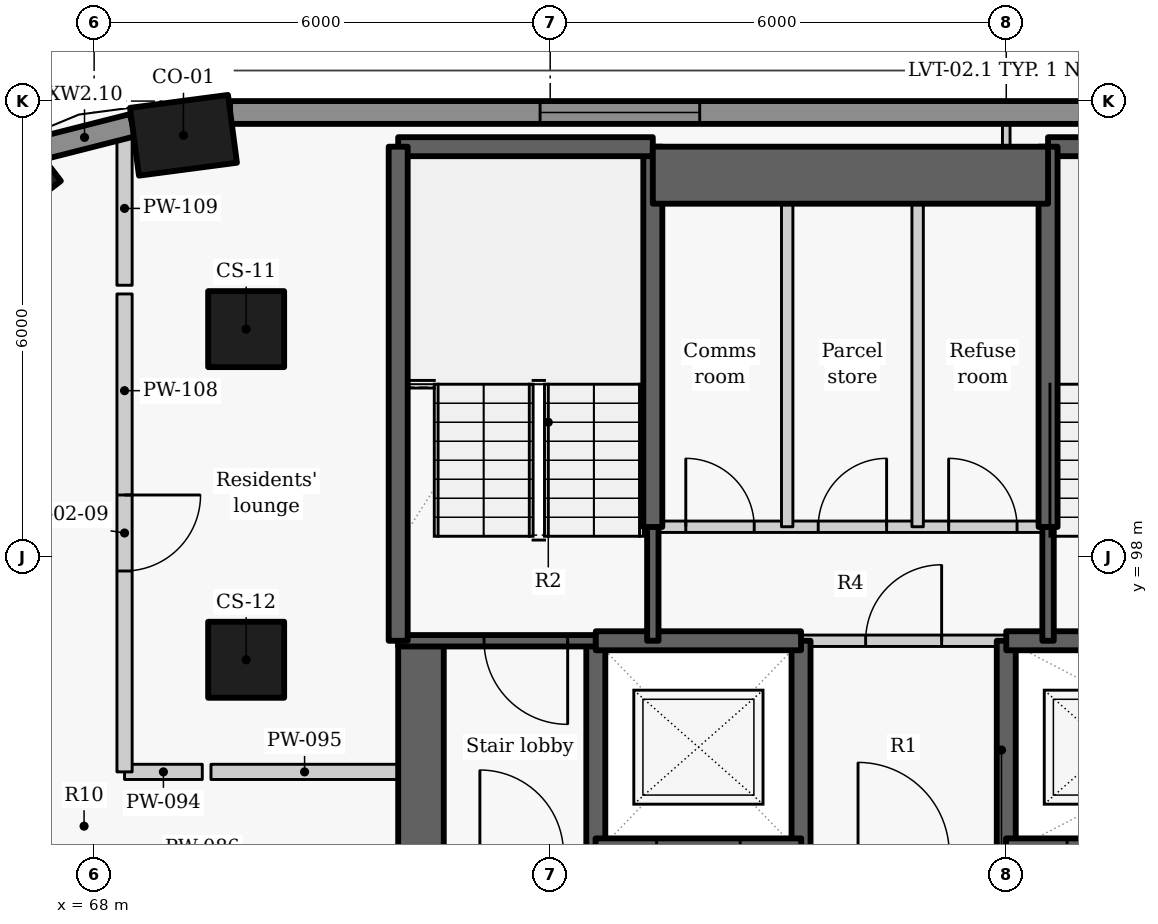
"""IFC4 building model, lengths in metres.
Left out: names, types, materials, properties, quantities, classifications, styles, units other than length and angle.
Written with IfcOpenShell. Run it as: python <this file> out.ifc"""

import sys

from ifc_helpers import new_model, si_unit, direction, frame, frame_2d, origin, origin_2d, place, context, subcontext, project, spatial, rectangle, extrude, element, fill, save


model = new_model("IFC4")
c1 = context("Model", 3, precision=1e-05, world=origin(), true_north=direction((0.0, 1.0)))
c2 = subcontext(c1, "Body", "Model", "MODEL_VIEW")
j1 = project(units=[si_unit("LENGTHUNIT", "METRE"), si_unit("PLANEANGLEUNIT", "RADIAN")], contexts=[c1])
p1 = place(None, origin())
s1 = spatial("IfcSite", under=j1, at=p1, CompositionType="ELEMENT")
p2 = place(p1, origin())
s2 = spatial("IfcBuilding", under=s1, at=p2, CompositionType="ELEMENT")
p3 = place(p2, frame((0.0, 0.0, 127.2)))
s3 = spatial("IfcBuildingStorey", under=s2, at=p3, CompositionType="ELEMENT", Elevation=127.2)
for number, where, z_axis, x_axis in (
    (1, (69.175, 103.55, 0.0), (0.0, 0.0, 1.0), (-0.991, -0.131, 0.0)),
    (2, (66.773, 102.91, 0.0), (0.0, 0.0, 1.0), (-0.793, -0.609, 0.0)),
):
    element("IfcColumn", number, at=place(p3, frame(where, z_axis=z_axis, x_axis=x_axis)), inside=s3, PredefinedType="COLUMN", context=c2, shape_type="SweptSolid", body=[
        extrude(rectangle(XDim=1.3, YDim=0.9, at=origin_2d()), origin(), (0.0, 0.0, 1.0), 3.3),
    ])
for number, where, z_axis, x_axis in (
    (3, (70.0, 101.0, 0.0), (0.0, 0.0, 1.0), (0.0, -1.0, 0.0)),
    (4, (70.0, 96.65, 0.0), (0.0, 0.0, 1.0), (0.0, -1.0, 0.0)),
):
    element("IfcColumn", number, at=place(p3, frame(where, z_axis=z_axis, x_axis=x_axis)), inside=s3, PredefinedType="COLUMN", context=c2, shape_type="SweptSolid", body=[
        extrude(rectangle(XDim=1.0, YDim=1.0, at=origin_2d()), origin(), (0.0, 0.0, 1.0), 3.3),
    ])
p4 = place(p3, frame((90.179, 103.85, 0.0), z_axis=(0.0, 0.0, 1.0), x_axis=(-1.0, 0.0, 0.0)))
e5 = element("IfcWall", 5, at=p4, inside=s3, PredefinedType="SOLIDWALL", context=c2, shape_type="SweptSolid", body=[
    extrude(rectangle(XDim=20.391, YDim=0.3, at=frame_2d((10.196, 0.0))), origin(), (0.0, 0.0, 1.0), 2.425),
])
p5 = place(p4, frame((4.051, 0.0, 0.9)))
e6 = element("IfcOpeningElement", 6, at=p5, cuts=e5, PredefinedType="OPENING", context=c2, shape_type="SweptSolid", body=[
    extrude(rectangle(XDim=2.1, YDim=1.1, at=frame_2d((1.05, 0.55))), frame((0.0, 0.16, 0.0), z_axis=(0.0, -1.0, 0.0), x_axis=(1.0, 0.0, 0.0)), (0.0, 0.0, 1.0), 0.32),
])
p6 = place(p4, frame((14.212, 0.0, 0.9)))
e7 = element("IfcOpeningElement", 7, at=p6, cuts=e5, PredefinedType="OPENING", context=c2, shape_type="SweptSolid", body=[
    extrude(rectangle(XDim=2.1, YDim=1.1, at=frame_2d((1.05, 0.55))), frame((0.0, 0.16, 0.0), z_axis=(0.0, -1.0, 0.0), x_axis=(1.0, 0.0, 0.0)), (0.0, 0.0, 1.0), 0.32),
])
p7 = place(p3, frame((68.506, 103.683, 0.0), z_axis=(0.0, 0.0, 1.0), x_axis=(-0.96924493129, -0.246098076322, 0.0)))
e8 = element("IfcWall", 8, at=p7, inside=s3, PredefinedType="SOLIDWALL", context=c2, shape_type="SweptSolid", body=[
    extrude(rectangle(XDim=1.305, YDim=0.3, at=frame_2d((0.653, 0.0))), origin(), (0.0, 0.0, 1.0), 2.425),
])
p8 = place(p3, frame((74.6, 94.1, -0.41), z_axis=(0.0, 0.0, 1.0), x_axis=(0.0, 1.0, 0.0)))
e9 = element("IfcWall", 9, at=p8, inside=s3, PredefinedType="SHEAR", context=c2, shape_type="SweptSolid", body=[
    extrude(rectangle(XDim=2.8, YDim=0.25, at=frame_2d((1.4, 0.0))), origin(), (0.0, 0.0, 1.0), 3.435),
])
p9 = place(p3, frame((72.3, 87.8, -0.41), z_axis=(0.0, 0.0, 1.0), x_axis=(0.0, 1.0, 0.0)))
e10 = element("IfcWall", 10, at=p9, inside=s3, PredefinedType="SHEAR", context=c2, shape_type="SweptSolid", body=[
    extrude(rectangle(XDim=9.1, YDim=0.6, at=frame_2d((4.55, 0.0))), origin(), (0.0, 0.0, 1.0), 3.435),
])
p10 = place(p9, frame((3.852, 0.0, 0.41)))
e11 = element("IfcOpeningElement", 11, at=p10, cuts=e10, PredefinedType="OPENING", context=c2, shape_type="SweptSolid", body=[
    extrude(rectangle(XDim=1.5, YDim=2.1, at=frame_2d((0.75, 1.05))), frame((0.0, 0.31, 0.0), z_axis=(0.0, -1.0, 0.0), x_axis=(1.0, 0.0, 0.0)), (0.0, 0.0, 1.0), 0.62),
])
for number, where, z_axis, x_axis in (
    (12, (77.3, 94.1, -0.41), (0.0, 0.0, 1.0), (0.0, 1.0, 0.0)),
    (13, (80.0, 94.1, -0.41), (0.0, 0.0, 1.0), (0.0, 1.0, 0.0)),
):
    element("IfcWall", number, at=place(p3, frame(where, z_axis=z_axis, x_axis=x_axis)), inside=s3, PredefinedType="SHEAR", context=c2, shape_type="SweptSolid", body=[
        extrude(rectangle(XDim=2.8, YDim=0.25, at=frame_2d((1.4, 0.0))), origin(), (0.0, 0.0, 1.0), 3.435),
    ])
p11 = place(p3, frame((74.597, 94.1, -0.41), z_axis=(0.0, 0.0, 1.0), x_axis=(1.0, 0.0, 0.0)))
e14 = element("IfcWall", 14, at=p11, inside=s3, PredefinedType="SHEAR", context=c2, shape_type="SweptSolid", body=[
    extrude(rectangle(XDim=2.706, YDim=0.4, at=frame_2d((1.353, 0.0))), origin(), (0.0, 0.0, 1.0), 3.435),
])
p12 = place(p11, frame((0.803, 0.0, 0.41)))
e15 = element("IfcOpeningElement", 15, at=p12, cuts=e14, PredefinedType="OPENING", context=c2, shape_type="SweptSolid", body=[
    extrude(rectangle(XDim=1.1, YDim=2.1, at=frame_2d((0.55, 1.05))), frame((0.0, 0.21, 0.0), z_axis=(0.0, -1.0, 0.0), x_axis=(1.0, 0.0, 0.0)), (0.0, 0.0, 1.0), 0.42),
])
p13 = place(p3, frame((79.997, 94.1, -0.41), z_axis=(0.0, 0.0, 1.0), x_axis=(1.0, 0.0, 0.0)))
e16 = element("IfcWall", 16, at=p13, inside=s3, PredefinedType="SHEAR", context=c2, shape_type="SweptSolid", body=[
    extrude(rectangle(XDim=5.406, YDim=0.4, at=frame_2d((2.703, 0.0))), origin(), (0.0, 0.0, 1.0), 3.435),
])
p14 = place(p13, frame((0.803, 0.0, 0.41)))
e17 = element("IfcOpeningElement", 17, at=p14, cuts=e16, PredefinedType="OPENING", context=c2, shape_type="SweptSolid", body=[
    extrude(rectangle(XDim=1.1, YDim=2.1, at=frame_2d((0.55, 1.05))), frame((0.0, 0.21, 0.0), z_axis=(0.0, -1.0, 0.0), x_axis=(1.0, 0.0, 0.0)), (0.0, 0.0, 1.0), 0.42),
])
p15 = place(p3, frame((74.6, 96.9, -0.41), z_axis=(0.0, 0.0, 1.0), x_axis=(-1.0, 0.0, 0.0)))
e18 = element("IfcWall", 18, at=p15, inside=s3, PredefinedType="SHEAR", context=c2, shape_type="SweptSolid", body=[
    extrude(rectangle(XDim=2.6, YDim=0.15, at=frame_2d((1.3, 0.0))), origin(), (0.0, 0.0, 1.0), 3.435),
])
p16 = place(p15, frame((0.37, 0.0, 0.41)))
e19 = element("IfcOpeningElement", 19, at=p16, cuts=e18, PredefinedType="OPENING", context=c2, shape_type="SweptSolid", body=[
    extrude(rectangle(XDim=1.1, YDim=2.1, at=frame_2d((0.55, 1.05))), frame((0.0, 0.085, 0.0), z_axis=(0.0, -1.0, 0.0), x_axis=(1.0, 0.0, 0.0)), (0.0, 0.0, 1.0), 0.17),
])
p17 = place(p3, frame((74.6, 96.9, -0.41), z_axis=(0.0, 0.0, 1.0), x_axis=(1.0, 0.0, 0.0)))
e20 = element("IfcWall", 20, at=p17, inside=s3, PredefinedType="SHEAR", context=c2, shape_type="SweptSolid", body=[
    extrude(rectangle(XDim=2.7, YDim=0.25, at=frame_2d((1.35, 0.0))), origin(), (0.0, 0.0, 1.0), 3.435),
])
p18 = place(p3, frame((80.0, 96.9, -0.41), z_axis=(0.0, 0.0, 1.0), x_axis=(1.0, 0.0, 0.0)))
e21 = element("IfcWall", 21, at=p18, inside=s3, PredefinedType="SHEAR", context=c2, shape_type="SweptSolid", body=[
    extrude(rectangle(XDim=8.0, YDim=0.25, at=frame_2d((4.0, 0.0))), origin(), (0.0, 0.0, 1.0), 3.435),
])
p19 = place(p18, frame((3.849, 0.0, 0.41)))
e22 = element("IfcOpeningElement", 22, at=p19, cuts=e21, PredefinedType="OPENING", context=c2, shape_type="SweptSolid", body=[
    extrude(rectangle(XDim=1.1, YDim=2.1, at=frame_2d((0.55, 1.05))), frame((0.0, 0.135, 0.0), z_axis=(0.0, -1.0, 0.0), x_axis=(1.0, 0.0, 0.0)), (0.0, 0.0, 1.0), 0.27),
])
p20 = place(p3, frame((77.3, 96.9, 0.0), z_axis=(0.0, 0.0, 1.0), x_axis=(1.0, 0.0, 0.0)))
e23 = element("IfcWall", 23, at=p20, inside=s3, PredefinedType="PARTITIONING", context=c2, shape_type="SweptSolid", body=[
    extrude(rectangle(XDim=2.7, YDim=0.15, at=frame_2d((1.35, 0.0))), origin(), (0.0, 0.0, 1.0), 3.025),
])
p21 = place(p20, frame((0.85, 0.0, 0.0)))
e24 = element("IfcOpeningElement", 24, at=p21, cuts=e23, PredefinedType="OPENING", context=c2, shape_type="SweptSolid", body=[
    extrude(rectangle(XDim=1.0, YDim=2.1, at=frame_2d((0.5, 1.05))), frame((0.0, 0.085, 0.0), z_axis=(0.0, -1.0, 0.0), x_axis=(1.0, 0.0, 0.0)), (0.0, 0.0, 1.0), 0.17),
])
p22 = place(p3, frame((75.35, 96.9, -0.41), z_axis=(0.0, 0.0, 1.0), x_axis=(0.0, 1.0, 0.0)))
e25 = element("IfcWall", 25, at=p22, inside=s3, PredefinedType="SHEAR", context=c2, shape_type="SweptSolid", body=[
    extrude(rectangle(XDim=1.503, YDim=0.15, at=frame_2d((0.751, 0.0))), origin(), (0.0, 0.0, 1.0), 3.435),
])
p23 = place(p3, frame((75.35, 98.397, -0.41), z_axis=(0.0, 0.0, 1.0), x_axis=(0.0, 1.0, 0.0)))
e26 = element("IfcWall", 26, at=p23, inside=s3, PredefinedType="SHEAR", context=c2, shape_type="SweptSolid", body=[
    extrude(rectangle(XDim=5.003, YDim=0.25, at=frame_2d((2.501, 0.0))), origin(), (0.0, 0.0, 1.0), 3.435),
])
p24 = place(p3, frame((72.0, 103.4, 0.0), z_axis=(0.0, 0.0, 1.0), x_axis=(1.0, 0.0, 0.0)))
e27 = element("IfcWall", 27, at=p24, inside=s3, PredefinedType="SHEAR", context=c2, shape_type="SweptSolid", body=[
    extrude(rectangle(XDim=3.35, YDim=0.25, at=frame_2d((1.675, 0.0))), origin(), (0.0, 0.0, 1.0), 3.025),
])
p25 = place(p3, frame((80.55, 103.4, 0.0), z_axis=(0.0, 0.0, 1.0), x_axis=(1.0, 0.0, 0.0)))
e28 = element("IfcWall", 28, at=p25, inside=s3, PredefinedType="SHEAR", context=c2, shape_type="SweptSolid", body=[
    extrude(rectangle(XDim=2.85, YDim=0.25, at=frame_2d((1.425, 0.0))), origin(), (0.0, 0.0, 1.0), 3.025),
])
p26 = place(p3, frame((72.0, 96.9, -0.41), z_axis=(0.0, 0.0, 1.0), x_axis=(0.0, 1.0, 0.0)))
e29 = element("IfcWall", 29, at=p26, inside=s3, PredefinedType="SHEAR", context=c2, shape_type="SweptSolid", body=[
    extrude(rectangle(XDim=6.5, YDim=0.25, at=frame_2d((3.25, 0.0))), origin(), (0.0, 0.0, 1.0), 3.435),
])
p27 = place(p3, frame((80.55, 96.9, -0.41), z_axis=(0.0, 0.0, 1.0), x_axis=(0.0, 1.0, 0.0)))
e30 = element("IfcWall", 30, at=p27, inside=s3, PredefinedType="SHEAR", context=c2, shape_type="SweptSolid", body=[
    extrude(rectangle(XDim=1.503, YDim=0.15, at=frame_2d((0.751, 0.0))), origin(), (0.0, 0.0, 1.0), 3.435),
])
p28 = place(p3, frame((80.55, 98.397, -0.41), z_axis=(0.0, 0.0, 1.0), x_axis=(0.0, 1.0, 0.0)))
e31 = element("IfcWall", 31, at=p28, inside=s3, PredefinedType="SHEAR", context=c2, shape_type="SweptSolid", body=[
    extrude(rectangle(XDim=5.003, YDim=0.25, at=frame_2d((2.501, 0.0))), origin(), (0.0, 0.0, 1.0), 3.435),
])
p29 = place(p3, frame((75.35, 103.025, -0.41), z_axis=(0.0, 0.0, 1.0), x_axis=(1.0, 0.0, 0.0)))
e32 = element("IfcWall", 32, at=p29, inside=s3, PredefinedType="SHEAR", context=c2, shape_type="SweptSolid", body=[
    extrude(rectangle(XDim=5.2, YDim=0.75, at=frame_2d((2.6, 0.0))), origin(), (0.0, 0.0, 1.0), 3.435),
])
p30 = place(p3, frame((75.35, 98.4, 0.0), z_axis=(0.0, 0.0, 1.0), x_axis=(1.0, 0.0, 0.0)))
e33 = element("IfcWall", 33, at=p30, inside=s3, PredefinedType="PARTITIONING", context=c2, shape_type="SweptSolid", body=[
    extrude(rectangle(XDim=5.2, YDim=0.15, at=frame_2d((2.6, 0.0))), origin(), (0.0, 0.0, 1.0), 3.025),
])
p31 = place(p30, frame((0.434, 0.0, 0.0)))
e34 = element("IfcOpeningElement", 34, at=p31, cuts=e33, PredefinedType="OPENING", context=c2, shape_type="SweptSolid", body=[
    extrude(rectangle(XDim=0.9, YDim=2.1, at=frame_2d((0.45, 1.05))), frame((0.0, 0.085, 0.0), z_axis=(0.0, -1.0, 0.0), x_axis=(1.0, 0.0, 0.0)), (0.0, 0.0, 1.0), 0.17),
])
p32 = place(p30, frame((2.176, 0.0, 0.0)))
e35 = element("IfcOpeningElement", 35, at=p32, cuts=e33, PredefinedType="OPENING", context=c2, shape_type="SweptSolid", body=[
    extrude(rectangle(XDim=0.9, YDim=2.1, at=frame_2d((0.45, 1.05))), frame((0.0, 0.085, 0.0), z_axis=(0.0, -1.0, 0.0), x_axis=(1.0, 0.0, 0.0)), (0.0, 0.0, 1.0), 0.17),
])
p33 = place(p30, frame((3.892, 0.0, 0.0)))
e36 = element("IfcOpeningElement", 36, at=p33, cuts=e33, PredefinedType="OPENING", context=c2, shape_type="SweptSolid", body=[
    extrude(rectangle(XDim=0.9, YDim=2.1, at=frame_2d((0.45, 1.05))), frame((0.0, 0.085, 0.0), z_axis=(0.0, -1.0, 0.0), x_axis=(1.0, 0.0, 0.0)), (0.0, 0.0, 1.0), 0.17),
])
for number, where, z_axis, x_axis in (
    (37, (77.118, 98.4, 0.0), (0.0, 0.0, 1.0), (0.0, 1.0, 0.0)),
    (38, (78.834, 98.4, 0.0), (0.0, 0.0, 1.0), (0.0, 1.0, 0.0)),
):
    element("IfcWall", number, at=place(p3, frame(where, z_axis=z_axis, x_axis=x_axis)), inside=s3, PredefinedType="PARTITIONING", context=c2, shape_type="SweptSolid", body=[
        extrude(rectangle(XDim=5.0, YDim=0.15, at=frame_2d((2.5, 0.0))), origin(), (0.0, 0.0, 1.0), 3.025),
    ])
p34 = place(p3, frame((68.4, 95.175, 0.0), z_axis=(0.0, 0.0, 1.0), x_axis=(1.0, 0.0, 0.0)))
e39 = element("IfcWall", 39, at=p34, inside=s3, PredefinedType="PARTITIONING", context=c2, shape_type="SweptSolid", body=[
    extrude(rectangle(XDim=1.023, YDim=0.2, at=frame_2d((0.511, 0.0))), origin(), (0.0, 0.0, 1.0), 3.025),
])
p35 = place(p3, frame((69.537, 95.175, 0.0), z_axis=(0.0, 0.0, 1.0), x_axis=(1.0, 0.0, 0.0)))
e40 = element("IfcWall", 40, at=p35, inside=s3, PredefinedType="PARTITIONING", context=c2, shape_type="SweptSolid", body=[
    extrude(rectangle(XDim=2.463, YDim=0.2, at=frame_2d((1.231, 0.0))), origin(), (0.0, 0.0, 1.0), 2.505),
])
p36 = place(p3, frame((68.4, 101.463, 0.0), z_axis=(0.0, 0.0, 1.0), x_axis=(0.0, -1.0, 0.0)))
e41 = element("IfcWall", 41, at=p36, inside=s3, PredefinedType="PARTITIONING", context=c2, shape_type="SweptSolid", body=[
    extrude(rectangle(XDim=6.288, YDim=0.2, at=frame_2d((3.144, 0.0))), origin(), (0.0, 0.0, 1.0), 3.025),
])
p37 = place(p36, frame((2.645, 0.0, 0.0)))
e42 = element("IfcOpeningElement", 42, at=p37, cuts=e41, PredefinedType="OPENING", context=c2, shape_type="SweptSolid", body=[
    extrude(rectangle(XDim=1.0, YDim=2.1, at=frame_2d((0.5, 1.05))), frame((0.0, 0.11, 0.0), z_axis=(0.0, -1.0, 0.0), x_axis=(1.0, 0.0, 0.0)), (0.0, 0.0, 1.0), 0.22),
])
p38 = place(p3, frame((68.4, 101.577, 0.0), z_axis=(0.0, 0.0, 1.0), x_axis=(0.0, 1.0, 0.0)))
e43 = element("IfcWall", 43, at=p38, inside=s3, PredefinedType="PARTITIONING", context=c2, shape_type="SweptSolid", body=[
    extrude(rectangle(XDim=2.022, YDim=0.2, at=frame_2d((1.011, 0.0))), origin(), (0.0, 0.0, 1.0), 2.405),
])
p39 = place(p3, frame((80.0, 103.4, 0.0), z_axis=(0.0, 0.0, 1.0), x_axis=(0.0, 1.0, 0.0)))
e44 = element("IfcWall", 44, at=p39, inside=s3, PredefinedType="PARTITIONING", context=c2, shape_type="SweptSolid", body=[
    extrude(rectangle(XDim=0.3, YDim=0.1, at=frame_2d((0.15, 0.0))), origin(), (0.0, 0.0, 1.0), 3.025),
])
p40 = place(p6, origin())
e45 = element("IfcWindow", 45, at=p40, inside=s3, PartitioningType="SINGLE_PANEL", PredefinedType="WINDOW", context=c2, shape_type="SweptSolid", body=[
    extrude(rectangle(XDim=2.1, YDim=1.1, at=frame_2d((1.05, 0.55))), frame((0.0, 0.03, 0.0), z_axis=(0.0, -1.0, 0.0), x_axis=(1.0, 0.0, 0.0)), (0.0, 0.0, 1.0), 0.06),
])
fill(e7, e45)
p41 = place(p21, origin())
e46 = element("IfcDoor", 46, at=p41, inside=s3, OperationType="SINGLE_SWING_RIGHT", PredefinedType="DOOR", context=c2, shape_type="SweptSolid", body=[
    extrude(rectangle(XDim=1.0, YDim=2.1, at=frame_2d((0.5, 1.05))), frame((0.0, 0.025, 0.0), z_axis=(0.0, -1.0, 0.0), x_axis=(1.0, 0.0, 0.0)), (0.0, 0.0, 1.0), 0.05),
])
fill(e24, e46)
p42 = place(p31, origin())
e47 = element("IfcDoor", 47, at=p42, inside=s3, OperationType="SINGLE_SWING_LEFT", PredefinedType="DOOR", context=c2, shape_type="SweptSolid", body=[
    extrude(rectangle(XDim=0.9, YDim=2.1, at=frame_2d((0.45, 1.05))), frame((0.0, 0.025, 0.0), z_axis=(0.0, -1.0, 0.0), x_axis=(1.0, 0.0, 0.0)), (0.0, 0.0, 1.0), 0.05),
])
fill(e34, e47)
p43 = place(p32, origin())
e48 = element("IfcDoor", 48, at=p43, inside=s3, OperationType="SINGLE_SWING_RIGHT", PredefinedType="DOOR", context=c2, shape_type="SweptSolid", body=[
    extrude(rectangle(XDim=0.9, YDim=2.1, at=frame_2d((0.45, 1.05))), frame((0.0, 0.025, 0.0), z_axis=(0.0, -1.0, 0.0), x_axis=(1.0, 0.0, 0.0)), (0.0, 0.0, 1.0), 0.05),
])
fill(e35, e48)
p44 = place(p33, origin())
e49 = element("IfcDoor", 49, at=p44, inside=s3, OperationType="SINGLE_SWING_LEFT", PredefinedType="DOOR", context=c2, shape_type="SweptSolid", body=[
    extrude(rectangle(XDim=0.9, YDim=2.1, at=frame_2d((0.45, 1.05))), frame((0.0, 0.025, 0.0), z_axis=(0.0, -1.0, 0.0), x_axis=(1.0, 0.0, 0.0)), (0.0, 0.0, 1.0), 0.05),
])
fill(e36, e49)
p45 = place(p16, origin())
e50 = element("IfcDoor", 50, at=p45, inside=s3, OperationType="SINGLE_SWING_LEFT", PredefinedType="DOOR", context=c2, shape_type="SweptSolid", body=[
    extrude(rectangle(XDim=1.1, YDim=2.1, at=frame_2d((0.55, 1.05))), frame((0.0, 0.025, 0.0), z_axis=(0.0, -1.0, 0.0), x_axis=(1.0, 0.0, 0.0)), (0.0, 0.0, 1.0), 0.05),
])
fill(e19, e50)
p46 = place(p37, origin())
e51 = element("IfcDoor", 51, at=p46, inside=s3, OperationType="SINGLE_SWING_LEFT", PredefinedType="DOOR", context=c2, shape_type="SweptSolid", body=[
    extrude(rectangle(XDim=1.0, YDim=2.1, at=frame_2d((0.5, 1.05))), frame((0.0, 0.025, 0.0), z_axis=(0.0, -1.0, 0.0), x_axis=(1.0, 0.0, 0.0)), (0.0, 0.0, 1.0), 0.05),
])
fill(e42, e51)
save(model, sys.argv[1])
